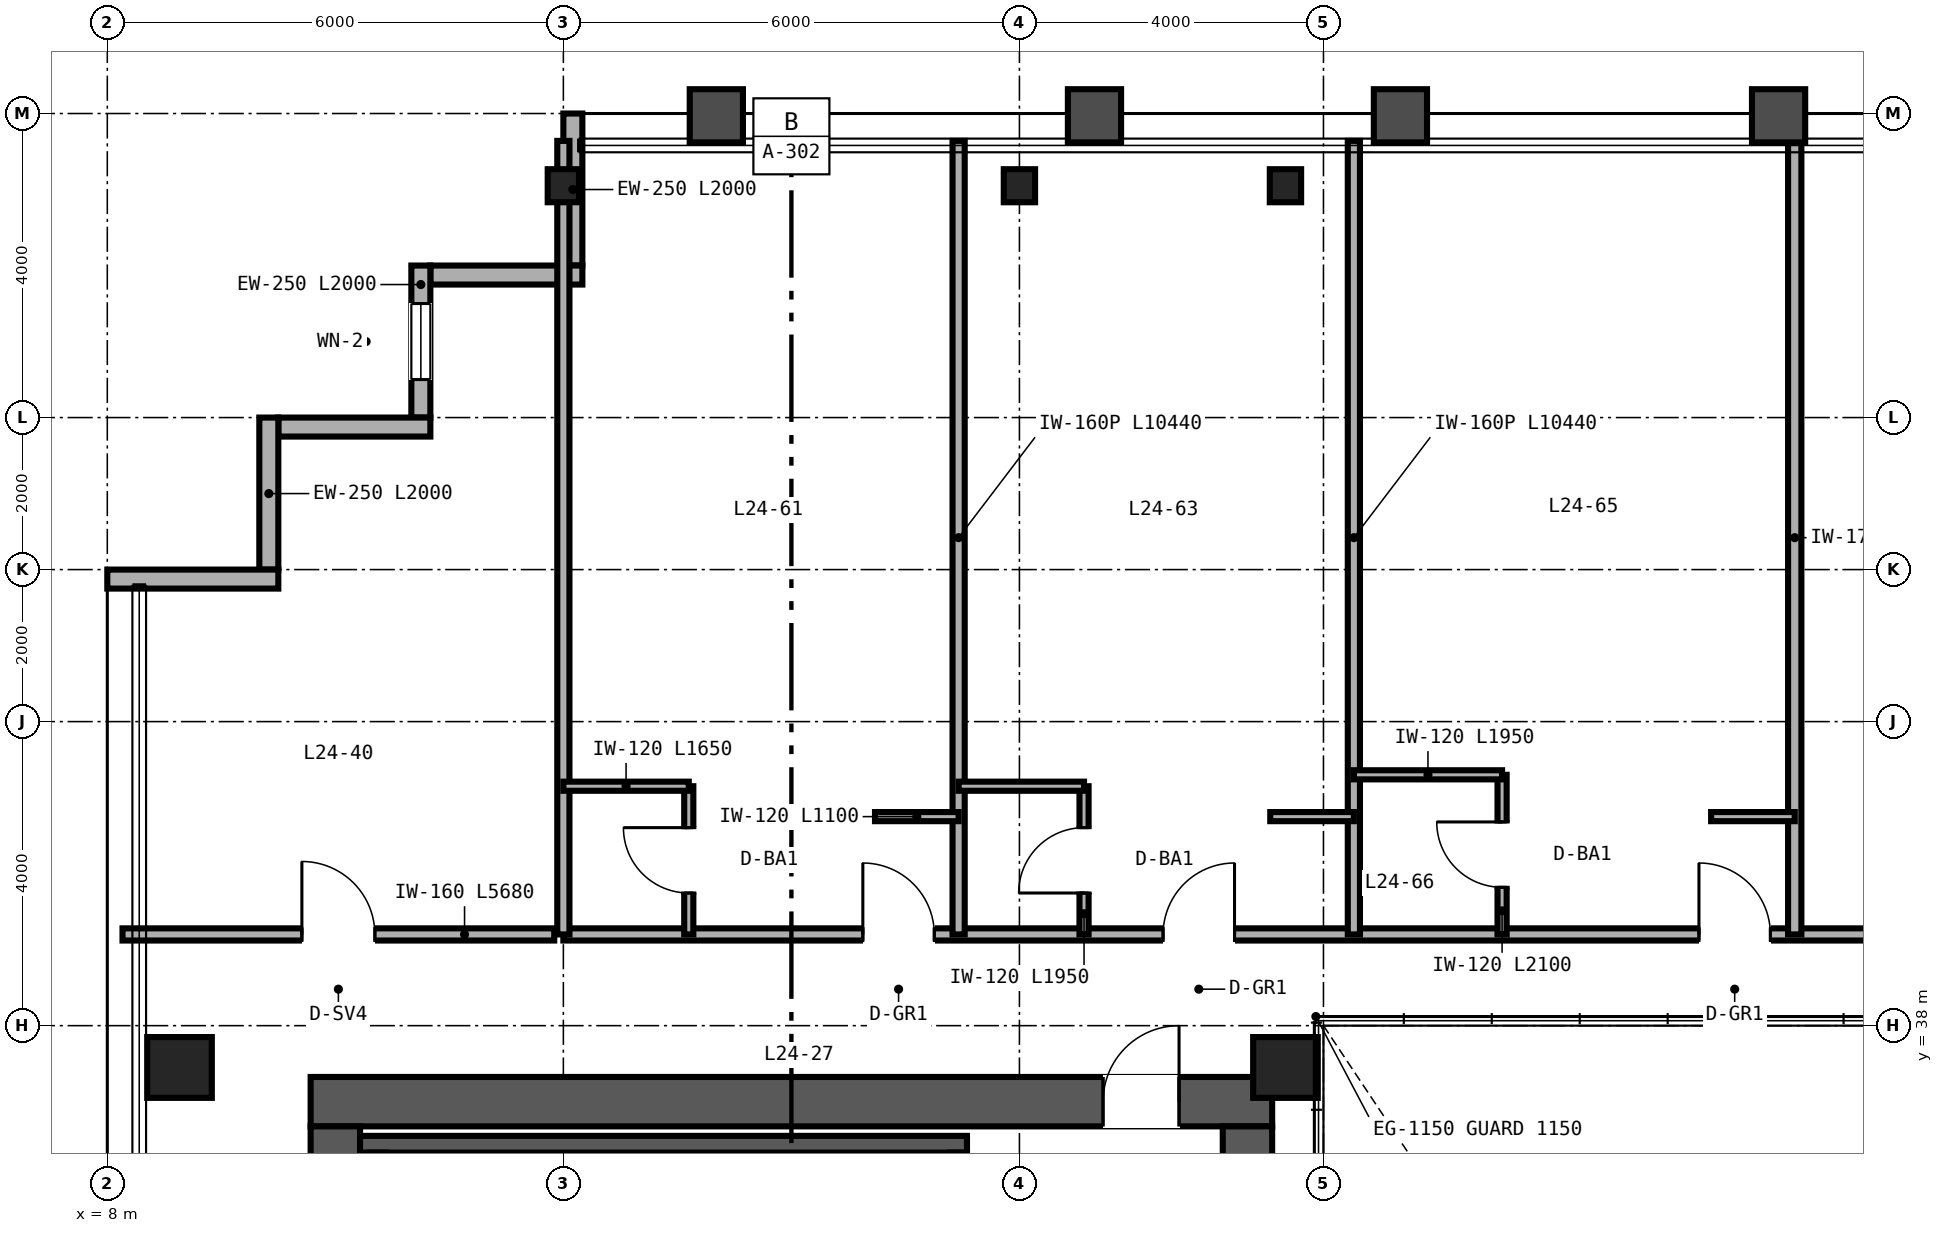
"""IFC4 building model, lengths in metres.
Left out: names, types, materials, properties, quantities, classifications, styles, units other than length and angle.
Written with IfcOpenShell. Run it as: python <this file> out.ifc"""

import sys

from ifc_helpers import new_model, si_unit, direction, frame, frame_2d, origin, origin_2d, place, context, subcontext, project, spatial, rectangle, hollow_rectangle, i_section, extrude, source, transform, mapped, element, fill, save


model = new_model("IFC4")
c1 = context("Model", 3, precision=1e-05, world=origin(), true_north=direction((0.0, 1.0)))
c2 = subcontext(c1, "Body", "Model", "MODEL_VIEW")
j1 = project(units=[si_unit("LENGTHUNIT", "METRE"), si_unit("PLANEANGLEUNIT", "RADIAN")], contexts=[c1])
p1 = place(None, origin())
s1 = spatial("IfcSite", under=j1, at=p1, CompositionType="ELEMENT")
p2 = place(p1, origin())
s2 = spatial("IfcBuilding", under=s1, at=p2, CompositionType="ELEMENT")
p3 = place(p2, frame((0.0, 0.0, 100.8)))
s3 = spatial("IfcBuildingStorey", under=s2, at=p3, CompositionType="ELEMENT", Elevation=100.8)
p4 = place(p3, frame((10.675, 37.0, 0.0), z_axis=(0.0, 0.0, 1.0), x_axis=(1.0, 0.0, 0.0)))
e1 = element("IfcWall", 1, at=p4, inside=s3, PredefinedType="SHEAR", context=c2, shape_type="SweptSolid", body=[
    extrude(rectangle(XDim=12.65, YDim=0.65, at=frame_2d((6.325, 0.0))), origin(), (0.0, 0.0, 1.0), 3.36),
])
p5 = place(p4, frame((10.425, 0.0, 0.0)))
e2 = element("IfcOpeningElement", 2, at=p5, cuts=e1, PredefinedType="OPENING", context=c2, shape_type="SweptSolid", body=[
    extrude(rectangle(XDim=1.0, YDim=2.15, at=frame_2d((0.5, 1.075))), frame((0.0, 0.335, 0.0), z_axis=(0.0, -1.0, 0.0), x_axis=(1.0, 0.0, 0.0)), (0.0, 0.0, 1.0), 0.67),
])
for number, where, z_axis, x_axis in (
    (3, (11.0, 15.325, 0.0), (0.0, 0.0, 1.0), (0.0, 1.0, 0.0)),
    (4, (23.0, 15.325, 0.0), (0.0, 0.0, 1.0), (0.0, 1.0, 0.0)),
):
    element("IfcWall", number, at=place(p3, frame(where, z_axis=z_axis, x_axis=x_axis)), inside=s3, PredefinedType="SHEAR", context=c2, shape_type="SweptSolid", body=[
        extrude(rectangle(XDim=21.35, YDim=0.65, at=frame_2d((10.675, 0.0))), origin(), (0.0, 0.0, 1.0), 3.36),
    ])
p6 = place(p3, frame((11.325, 36.44, 0.0), z_axis=(0.0, 0.0, 1.0), x_axis=(1.0, 0.0, 0.0)))
e5 = element("IfcWall", 5, at=p6, inside=s3, PredefinedType="SHEAR", context=c2, shape_type="SweptSolid", body=[
    extrude(rectangle(XDim=7.985, YDim=0.22, at=frame_2d((3.993, 0.0))), origin(), (0.0, 0.0, 1.0), 3.4),
])
for number, where, z_axis, x_axis in (
    (6, (11.56, 33.05, 0.0), (0.0, 0.0, 1.0), (0.0, 1.0, 0.0)),
    (7, (19.2, 33.05, 0.0), (0.0, 0.0, 1.0), (0.0, 1.0, 0.0)),
):
    element("IfcWall", number, at=place(p3, frame(where, z_axis=z_axis, x_axis=x_axis)), inside=s3, PredefinedType="SHEAR", context=c2, shape_type="SweptSolid", body=[
        extrude(rectangle(XDim=3.28, YDim=0.22, at=frame_2d((1.64, 0.0))), origin(), (0.0, 0.0, 1.0), 3.4),
    ])
m1 = source(origin(), c2, "Body", "SweptSolid", [
    extrude(hollow_rectangle(XDim=0.85, YDim=0.8, WallThickness=0.032, at=origin_2d()), origin(), (0.0, 0.0, 1.0), 3.36),
])
for number, where, z_axis, x_axis in (
    (8, (8.95, 37.45, 0.0), (0.0, 0.0, 1.0), (1.0, 0.0, 0.0)),
    (9, (23.5, 37.45, 0.0), (0.0, 0.0, 1.0), (1.0, 0.0, 0.0)),
):
    element("IfcColumn", number, at=place(p3, frame(where, z_axis=z_axis, x_axis=x_axis)), inside=s3, PredefinedType="COLUMN", context=c2, shape_type="MappedRepresentation", body=[
        mapped(m1, transform((0.0, 0.0, 0.0), scale=1.0)),
    ])
m2 = source(origin(), c2, "Body", "SweptSolid", [
    extrude(i_section(OverallWidth=0.412, OverallDepth=0.435, WebThickness=0.036, FlangeThickness=0.057, FilletRadius=0.025, at=origin_2d()), origin(), (0.0, 0.0, 1.0), 3.36),
])
for number, where, z_axis, x_axis in (
    (10, (14.0, 49.05, 0.0), (0.0, 0.0, 1.0), (1.0, 0.0, 0.0)),
    (11, (20.0, 49.05, 0.0), (0.0, 0.0, 1.0), (1.0, 0.0, 0.0)),
    (12, (23.5, 49.05, 0.0), (0.0, 0.0, 1.0), (1.0, 0.0, 0.0)),
):
    element("IfcColumn", number, at=place(p3, frame(where, z_axis=z_axis, x_axis=x_axis)), inside=s3, PredefinedType="COLUMN", context=c2, shape_type="MappedRepresentation", body=[
        mapped(m2, transform((0.0, 0.0, 0.0), scale=1.0)),
    ])
p7 = place(p3, frame((14.125, 50.0, 0.0), z_axis=(0.0, 0.0, 1.0), x_axis=(0.0, -1.0, 0.0)))
e13 = element("IfcWall", 13, at=p7, inside=s3, PredefinedType="SOLIDWALL", context=c2, shape_type="SweptSolid", body=[
    extrude(rectangle(XDim=2.0, YDim=0.25, at=frame_2d((1.0, 0.0))), origin(), (0.0, 0.0, 1.0), 2.667),
])
p8 = place(p3, frame((14.25, 47.875, 0.0), z_axis=(0.0, 0.0, 1.0), x_axis=(-1.0, 0.0, 0.0)))
e14 = element("IfcWall", 14, at=p8, inside=s3, PredefinedType="SOLIDWALL", context=c2, shape_type="SweptSolid", body=[
    extrude(rectangle(XDim=2.0, YDim=0.25, at=frame_2d((1.0, 0.0))), origin(), (0.0, 0.0, 1.0), 3.36),
])
p9 = place(p3, frame((12.125, 48.0, 0.0), z_axis=(0.0, 0.0, 1.0), x_axis=(0.0, -1.0, 0.0)))
e15 = element("IfcWall", 15, at=p9, inside=s3, PredefinedType="SOLIDWALL", context=c2, shape_type="SweptSolid", body=[
    extrude(rectangle(XDim=2.0, YDim=0.25, at=frame_2d((1.0, 0.0))), origin(), (0.0, 0.0, 1.0), 3.36),
])
p10 = place(p9, frame((0.5, 0.0, 0.85)))
e16 = element("IfcOpeningElement", 16, at=p10, cuts=e15, PredefinedType="OPENING", context=c2, shape_type="SweptSolid", body=[
    extrude(rectangle(XDim=1.0, YDim=1.9, at=frame_2d((0.5, 0.95))), frame((0.0, 0.135, 0.0), z_axis=(0.0, -1.0, 0.0), x_axis=(1.0, 0.0, 0.0)), (0.0, 0.0, 1.0), 0.27),
])
for number, where, z_axis, x_axis in (
    (17, (12.25, 45.875, 0.0), (0.0, 0.0, 1.0), (-1.0, 0.0, 0.0)),
    (18, (10.125, 46.0, 0.0), (0.0, 0.0, 1.0), (0.0, -1.0, 0.0)),
):
    element("IfcWall", number, at=place(p3, frame(where, z_axis=z_axis, x_axis=x_axis)), inside=s3, PredefinedType="SOLIDWALL", context=c2, shape_type="SweptSolid", body=[
        extrude(rectangle(XDim=2.0, YDim=0.25, at=frame_2d((1.0, 0.0))), origin(), (0.0, 0.0, 1.0), 3.36),
    ])
p11 = place(p3, frame((10.25, 43.875, 0.0), z_axis=(0.0, 0.0, 1.0), x_axis=(-1.0, 0.0, 0.0)))
e19 = element("IfcWall", 19, at=p11, inside=s3, PredefinedType="SOLIDWALL", context=c2, shape_type="SweptSolid", body=[
    extrude(rectangle(XDim=2.25, YDim=0.25, at=frame_2d((1.125, 0.0))), origin(), (0.0, 0.0, 1.0), 3.36),
])
p12 = place(p3, frame((8.2, 39.2, 0.0), z_axis=(0.0, 0.0, 1.0), x_axis=(1.0, 0.0, 0.0)))
e20 = element("IfcWall", 20, at=p12, inside=s3, PredefinedType="PARTITIONING", context=c2, shape_type="SweptSolid", body=[
    extrude(rectangle(XDim=5.68, YDim=0.16, at=frame_2d((2.84, 0.0))), origin(), (0.0, 0.0, 1.0), 3.36),
])
p13 = place(p12, frame((2.36, 0.0, 0.0)))
e21 = element("IfcOpeningElement", 21, at=p13, cuts=e20, PredefinedType="OPENING", context=c2, shape_type="SweptSolid", body=[
    extrude(rectangle(XDim=0.96, YDim=2.15, at=frame_2d((0.48, 1.075))), frame((0.0, 0.09, 0.0), z_axis=(0.0, -1.0, 0.0), x_axis=(1.0, 0.0, 0.0)), (0.0, 0.0, 1.0), 0.18),
])
p14 = place(p3, frame((14.0, 39.2, 0.0), z_axis=(0.0, 0.0, 1.0), x_axis=(1.0, 0.0, 0.0)))
e22 = element("IfcWall", 22, at=p14, inside=s3, PredefinedType="PARTITIONING", context=c2, shape_type="SweptSolid", body=[
    extrude(rectangle(XDim=36.0, YDim=0.16, at=frame_2d((18.0, 0.0))), origin(), (0.0, 0.0, 1.0), 2.581),
])
p15 = place(p14, frame((3.94, 0.0, 0.0)))
e23 = element("IfcOpeningElement", 23, at=p15, cuts=e22, PredefinedType="OPENING", context=c2, shape_type="SweptSolid", body=[
    extrude(rectangle(XDim=0.94, YDim=2.15, at=frame_2d((0.47, 1.075))), frame((0.0, 0.09, 0.0), z_axis=(0.0, -1.0, 0.0), x_axis=(1.0, 0.0, 0.0)), (0.0, 0.0, 1.0), 0.18),
])
p16 = place(p14, frame((7.89, 0.0, 0.0)))
e24 = element("IfcOpeningElement", 24, at=p16, cuts=e22, PredefinedType="OPENING", context=c2, shape_type="SweptSolid", body=[
    extrude(rectangle(XDim=0.94, YDim=2.15, at=frame_2d((0.47, 1.075))), frame((0.0, 0.09, 0.0), z_axis=(0.0, -1.0, 0.0), x_axis=(1.0, 0.0, 0.0)), (0.0, 0.0, 1.0), 0.18),
])
p17 = place(p14, frame((14.94, 0.0, 0.0)))
e25 = element("IfcOpeningElement", 25, at=p17, cuts=e22, PredefinedType="OPENING", context=c2, shape_type="SweptSolid", body=[
    extrude(rectangle(XDim=0.94, YDim=2.15, at=frame_2d((0.47, 1.075))), frame((0.0, 0.09, 0.0), z_axis=(0.0, -1.0, 0.0), x_axis=(1.0, 0.0, 0.0)), (0.0, 0.0, 1.0), 0.18),
])
p18 = place(p14, frame((18.72, 0.0, 0.0)))
e26 = element("IfcOpeningElement", 26, at=p18, cuts=e22, PredefinedType="OPENING", context=c2, shape_type="SweptSolid", body=[
    extrude(rectangle(XDim=0.96, YDim=2.15, at=frame_2d((0.48, 1.075))), frame((0.0, 0.09, 0.0), z_axis=(0.0, -1.0, 0.0), x_axis=(1.0, 0.0, 0.0)), (0.0, 0.0, 1.0), 0.18),
])
p19 = place(p14, frame((24.79, 0.0, 0.0)))
e27 = element("IfcOpeningElement", 27, at=p19, cuts=e22, PredefinedType="OPENING", context=c2, shape_type="SweptSolid", body=[
    extrude(rectangle(XDim=0.94, YDim=2.15, at=frame_2d((0.47, 1.075))), frame((0.0, 0.09, 0.0), z_axis=(0.0, -1.0, 0.0), x_axis=(1.0, 0.0, 0.0)), (0.0, 0.0, 1.0), 0.18),
])
p20 = place(p14, frame((30.34, 0.0, 0.0)))
e28 = element("IfcOpeningElement", 28, at=p20, cuts=e22, PredefinedType="OPENING", context=c2, shape_type="SweptSolid", body=[
    extrude(rectangle(XDim=0.94, YDim=2.15, at=frame_2d((0.47, 1.075))), frame((0.0, 0.09, 0.0), z_axis=(0.0, -1.0, 0.0), x_axis=(1.0, 0.0, 0.0)), (0.0, 0.0, 1.0), 0.18),
])
p21 = place(p14, frame((34.74, 0.0, 0.0)))
e29 = element("IfcOpeningElement", 29, at=p21, cuts=e22, PredefinedType="OPENING", context=c2, shape_type="SweptSolid", body=[
    extrude(rectangle(XDim=0.94, YDim=2.15, at=frame_2d((0.47, 1.075))), frame((0.0, 0.09, 0.0), z_axis=(0.0, -1.0, 0.0), x_axis=(1.0, 0.0, 0.0)), (0.0, 0.0, 1.0), 0.18),
])
for number, where, z_axis, x_axis in (
    (30, (14.0, 39.2, 0.0), (0.0, 0.0, 1.0), (0.0, 1.0, 0.0)),
    (31, (19.2, 39.2, 0.0), (0.0, 0.0, 1.0), (0.0, 1.0, 0.0)),
):
    element("IfcWall", number, at=place(p3, frame(where, z_axis=z_axis, x_axis=x_axis)), inside=s3, PredefinedType="PARTITIONING", context=c2, shape_type="SweptSolid", body=[
        extrude(rectangle(XDim=10.44, YDim=0.16, at=frame_2d((5.22, 0.0))), origin(), (0.0, 0.0, 1.0), 2.667),
    ])
p22 = place(p3, frame((15.65, 39.2, 0.0), z_axis=(0.0, 0.0, 1.0), x_axis=(0.0, 1.0, 0.0)))
e32 = element("IfcWall", 32, at=p22, inside=s3, PredefinedType="PARTITIONING", context=c2, shape_type="SweptSolid", body=[
    extrude(rectangle(XDim=1.95, YDim=0.12, at=frame_2d((0.975, 0.0))), origin(), (0.0, 0.0, 1.0), 3.36),
])
p23 = place(p22, frame((0.545, 0.0, 0.0)))
e33 = element("IfcOpeningElement", 33, at=p23, cuts=e32, PredefinedType="OPENING", context=c2, shape_type="SweptSolid", body=[
    extrude(rectangle(XDim=0.86, YDim=2.1, at=frame_2d((0.43, 1.05))), frame((0.0, 0.07, 0.0), z_axis=(0.0, -1.0, 0.0), x_axis=(1.0, 0.0, 0.0)), (0.0, 0.0, 1.0), 0.14),
])
p24 = place(p3, frame((14.0, 41.15, 0.0), z_axis=(0.0, 0.0, 1.0), x_axis=(1.0, 0.0, 0.0)))
e34 = element("IfcWall", 34, at=p24, inside=s3, PredefinedType="PARTITIONING", context=c2, shape_type="SweptSolid", body=[
    extrude(rectangle(XDim=1.65, YDim=0.12, at=frame_2d((0.825, 0.0))), origin(), (0.0, 0.0, 1.0), 3.36),
])
p25 = place(p3, frame((18.1, 40.75, 0.0), z_axis=(0.0, 0.0, 1.0), x_axis=(1.0, 0.0, 0.0)))
e35 = element("IfcWall", 35, at=p25, inside=s3, PredefinedType="PARTITIONING", context=c2, shape_type="SweptSolid", body=[
    extrude(rectangle(XDim=1.1, YDim=0.12, at=frame_2d((0.55, 0.0))), origin(), (0.0, 0.0, 1.0), 3.36),
])
p26 = place(p3, frame((24.4, 39.2, 0.0), z_axis=(0.0, 0.0, 1.0), x_axis=(0.0, 1.0, 0.0)))
e36 = element("IfcWall", 36, at=p26, inside=s3, PredefinedType="PARTITIONING", context=c2, shape_type="SweptSolid", body=[
    extrude(rectangle(XDim=10.44, YDim=0.16, at=frame_2d((5.22, 0.0))), origin(), (0.0, 0.0, 1.0), 2.433),
])
p27 = place(p3, frame((20.85, 39.2, 0.0), z_axis=(0.0, 0.0, 1.0), x_axis=(0.0, 1.0, 0.0)))
e37 = element("IfcWall", 37, at=p27, inside=s3, PredefinedType="PARTITIONING", context=c2, shape_type="SweptSolid", body=[
    extrude(rectangle(XDim=1.95, YDim=0.12, at=frame_2d((0.975, 0.0))), origin(), (0.0, 0.0, 1.0), 3.36),
])
p28 = place(p27, frame((0.545, 0.0, 0.0)))
e38 = element("IfcOpeningElement", 38, at=p28, cuts=e37, PredefinedType="OPENING", context=c2, shape_type="SweptSolid", body=[
    extrude(rectangle(XDim=0.86, YDim=2.1, at=frame_2d((0.43, 1.05))), frame((0.0, 0.07, 0.0), z_axis=(0.0, -1.0, 0.0), x_axis=(1.0, 0.0, 0.0)), (0.0, 0.0, 1.0), 0.14),
])
p29 = place(p3, frame((19.2, 41.15, 0.0), z_axis=(0.0, 0.0, 1.0), x_axis=(1.0, 0.0, 0.0)))
e39 = element("IfcWall", 39, at=p29, inside=s3, PredefinedType="PARTITIONING", context=c2, shape_type="SweptSolid", body=[
    extrude(rectangle(XDim=1.65, YDim=0.12, at=frame_2d((0.825, 0.0))), origin(), (0.0, 0.0, 1.0), 3.36),
])
p30 = place(p3, frame((23.3, 40.75, 0.0), z_axis=(0.0, 0.0, 1.0), x_axis=(1.0, 0.0, 0.0)))
e40 = element("IfcWall", 40, at=p30, inside=s3, PredefinedType="PARTITIONING", context=c2, shape_type="SweptSolid", body=[
    extrude(rectangle(XDim=1.1, YDim=0.12, at=frame_2d((0.55, 0.0))), origin(), (0.0, 0.0, 1.0), 2.581),
])
p31 = place(p3, frame((30.2, 39.2, 0.0), z_axis=(0.0, 0.0, 1.0), x_axis=(0.0, 1.0, 0.0)))
e41 = element("IfcWall", 41, at=p31, inside=s3, PredefinedType="PARTITIONING", context=c2, shape_type="SweptSolid", body=[
    extrude(rectangle(XDim=10.44, YDim=0.175, at=frame_2d((5.22, 0.0))), origin(), (0.0, 0.0, 1.0), 2.433),
])
p32 = place(p3, frame((26.35, 39.2, 0.0), z_axis=(0.0, 0.0, 1.0), x_axis=(0.0, 1.0, 0.0)))
e42 = element("IfcWall", 42, at=p32, inside=s3, PredefinedType="PARTITIONING", context=c2, shape_type="SweptSolid", body=[
    extrude(rectangle(XDim=2.1, YDim=0.12, at=frame_2d((1.05, 0.0))), origin(), (0.0, 0.0, 1.0), 3.36),
])
p33 = place(p32, frame((0.62, 0.0, 0.0)))
e43 = element("IfcOpeningElement", 43, at=p33, cuts=e42, PredefinedType="OPENING", context=c2, shape_type="SweptSolid", body=[
    extrude(rectangle(XDim=0.86, YDim=2.1, at=frame_2d((0.43, 1.05))), frame((0.0, 0.07, 0.0), z_axis=(0.0, -1.0, 0.0), x_axis=(1.0, 0.0, 0.0)), (0.0, 0.0, 1.0), 0.14),
])
p34 = place(p3, frame((24.4, 41.3, 0.0), z_axis=(0.0, 0.0, 1.0), x_axis=(1.0, 0.0, 0.0)))
e44 = element("IfcWall", 44, at=p34, inside=s3, PredefinedType="PARTITIONING", context=c2, shape_type="SweptSolid", body=[
    extrude(rectangle(XDim=1.95, YDim=0.12, at=frame_2d((0.975, 0.0))), origin(), (0.0, 0.0, 1.0), 3.36),
])
p35 = place(p3, frame((29.1, 40.75, 0.0), z_axis=(0.0, 0.0, 1.0), x_axis=(1.0, 0.0, 0.0)))
e45 = element("IfcWall", 45, at=p35, inside=s3, PredefinedType="PARTITIONING", context=c2, shape_type="SweptSolid", body=[
    extrude(rectangle(XDim=1.1, YDim=0.12, at=frame_2d((0.55, 0.0))), origin(), (0.0, 0.0, 1.0), 3.36),
])
m3 = source(origin(), c2, "Body", "SweptSolid", [
    extrude(rectangle(XDim=1.0, YDim=1.9, at=frame_2d((0.5, 0.95))), frame((0.0, 0.03, 0.0), z_axis=(0.0, -1.0, 0.0), x_axis=(1.0, 0.0, 0.0)), (0.0, 0.0, 1.0), 0.06),
])
p36 = place(p10, origin())
e46 = element("IfcWindow", 46, at=p36, inside=s3, PartitioningType="SINGLE_PANEL", PredefinedType="WINDOW", context=c2, shape_type="MappedRepresentation", body=[
    mapped(m3, transform((0.0, 0.0, 0.0), scale=1.0)),
])
fill(e16, e46)
m4 = source(origin(), c2, "Body", "SweptSolid", [
    extrude(rectangle(XDim=1.0, YDim=2.15, at=frame_2d((0.5, 1.075))), frame((0.0, 0.025, 0.0), z_axis=(0.0, -1.0, 0.0), x_axis=(1.0, 0.0, 0.0)), (0.0, 0.0, 1.0), 0.05),
])
p37 = place(p5, origin())
e47 = element("IfcDoor", 47, at=p37, inside=s3, OperationType="SINGLE_SWING_RIGHT", PredefinedType="DOOR", context=c2, shape_type="MappedRepresentation", body=[
    mapped(m4, transform((0.0, 0.0, 0.0), scale=1.0)),
])
fill(e2, e47)
m5 = source(origin(), c2, "Body", "SweptSolid", [
    extrude(rectangle(XDim=0.96, YDim=2.15, at=frame_2d((0.48, 1.075))), frame((0.0, 0.025, 0.0), z_axis=(0.0, -1.0, 0.0), x_axis=(1.0, 0.0, 0.0)), (0.0, 0.0, 1.0), 0.05),
])
p38 = place(p13, origin())
e48 = element("IfcDoor", 48, at=p38, inside=s3, OperationType="SINGLE_SWING_LEFT", PredefinedType="DOOR", context=c2, shape_type="MappedRepresentation", body=[
    mapped(m5, transform((0.0, 0.0, 0.0), scale=1.0)),
])
fill(e21, e48)
m6 = source(origin(), c2, "Body", "SweptSolid", [
    extrude(rectangle(XDim=0.86, YDim=2.1, at=frame_2d((0.43, 1.05))), frame((0.0, 0.025, 0.0), z_axis=(0.0, -1.0, 0.0), x_axis=(1.0, 0.0, 0.0)), (0.0, 0.0, 1.0), 0.05),
])
p39 = place(p23, origin())
e49 = element("IfcDoor", 49, at=p39, inside=s3, OperationType="SINGLE_SWING_RIGHT", PredefinedType="DOOR", context=c2, shape_type="MappedRepresentation", body=[
    mapped(m6, transform((0.0, 0.0, 0.0), scale=1.0)),
])
fill(e33, e49)
p40 = place(p28, origin())
e50 = element("IfcDoor", 50, at=p40, inside=s3, OperationType="SINGLE_SWING_LEFT", PredefinedType="DOOR", context=c2, shape_type="MappedRepresentation", body=[
    mapped(m6, transform((0.0, 0.0, 0.0), scale=1.0)),
])
fill(e38, e50)
p41 = place(p33, origin())
e51 = element("IfcDoor", 51, at=p41, inside=s3, OperationType="SINGLE_SWING_RIGHT", PredefinedType="DOOR", context=c2, shape_type="MappedRepresentation", body=[
    mapped(m6, transform((0.0, 0.0, 0.0), scale=1.0)),
])
fill(e43, e51)
m7 = source(origin(), c2, "Body", "SweptSolid", [
    extrude(rectangle(XDim=0.94, YDim=2.15, at=frame_2d((0.47, 1.075))), frame((0.0, 0.025, 0.0), z_axis=(0.0, -1.0, 0.0), x_axis=(1.0, 0.0, 0.0)), (0.0, 0.0, 1.0), 0.05),
])
p42 = place(p15, origin())
e52 = element("IfcDoor", 52, at=p42, inside=s3, OperationType="SINGLE_SWING_LEFT", PredefinedType="DOOR", context=c2, shape_type="MappedRepresentation", body=[
    mapped(m7, transform((0.0, 0.0, 0.0), scale=1.0)),
])
fill(e23, e52)
p43 = place(p16, origin())
e53 = element("IfcDoor", 53, at=p43, inside=s3, OperationType="SINGLE_SWING_RIGHT", PredefinedType="DOOR", context=c2, shape_type="MappedRepresentation", body=[
    mapped(m7, transform((0.0, 0.0, 0.0), scale=1.0)),
])
fill(e24, e53)
p44 = place(p17, origin())
e54 = element("IfcDoor", 54, at=p44, inside=s3, OperationType="SINGLE_SWING_LEFT", PredefinedType="DOOR", context=c2, shape_type="MappedRepresentation", body=[
    mapped(m7, transform((0.0, 0.0, 0.0), scale=1.0)),
])
fill(e25, e54)
save(model, sys.argv[1])
